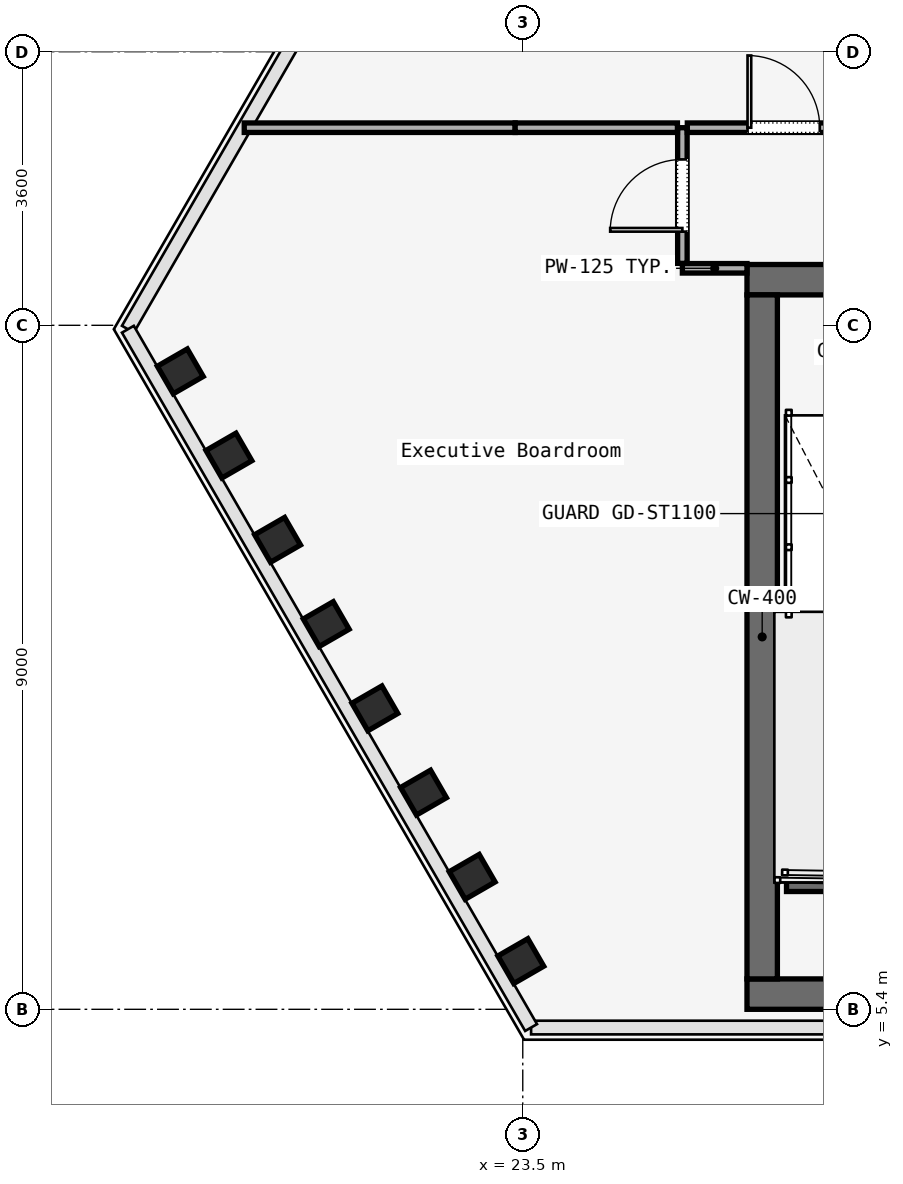
"""IFC4 building model, lengths in metres.
Left out: names, types, materials, properties, quantities, classifications, styles, units other than length and angle.
Written with IfcOpenShell. Run it as: python <this file> out.ifc"""

import sys

from ifc_helpers import new_model, si_unit, direction, frame, frame_2d, origin, origin_2d, place, context, subcontext, project, spatial, rectangle, i_section, extrude, element, fill, save


model = new_model("IFC4")
c1 = context("Model", 3, precision=1e-05, world=origin(), true_north=direction((0.0, 1.0)))
c2 = subcontext(c1, "Body", "Model", "MODEL_VIEW")
j1 = project(units=[si_unit("LENGTHUNIT", "METRE"), si_unit("PLANEANGLEUNIT", "RADIAN")], contexts=[c1])
p1 = place(None, origin())
s1 = spatial("IfcSite", under=j1, at=p1, CompositionType="ELEMENT")
p2 = place(p1, origin())
s2 = spatial("IfcBuilding", under=s1, at=p2, CompositionType="ELEMENT")
p3 = place(p2, frame((0.0, 0.0, 168.8)))
s3 = spatial("IfcBuildingStorey", under=s2, at=p3, CompositionType="ELEMENT", Elevation=168.8)
p4 = place(p3, frame((26.45, 15.0, 0.0), z_axis=(0.0, 0.0, 1.0), x_axis=(1.0, 0.0, 0.0)))
e1 = element("IfcWall", 1, at=p4, inside=s3, PredefinedType="SOLIDWALL", context=c2, shape_type="SweptSolid", body=[
    extrude(rectangle(XDim=31.1, YDim=0.4, at=frame_2d((15.55, 0.0))), origin(), (0.0, 0.0, 1.0), 3.58),
])
p5 = place(p4, frame((1.65, 0.0, 0.0)))
e2 = element("IfcOpeningElement", 2, at=p5, cuts=e1, PredefinedType="OPENING", context=c2, shape_type="SweptSolid", body=[
    extrude(rectangle(XDim=1.1, YDim=2.2, at=frame_2d((0.55, 1.1))), frame((0.0, 0.2, 0.0), z_axis=(0.0, -1.0, 0.0), x_axis=(1.0, 0.0, 0.0)), (0.0, 0.0, 1.0), 0.4),
])
p6 = place(p4, frame((13.65, 0.0, 0.0)))
e3 = element("IfcOpeningElement", 3, at=p6, cuts=e1, PredefinedType="OPENING", context=c2, shape_type="SweptSolid", body=[
    extrude(rectangle(XDim=1.1, YDim=2.2, at=frame_2d((0.55, 1.1))), frame((0.0, 0.2, 0.0), z_axis=(0.0, -1.0, 0.0), x_axis=(1.0, 0.0, 0.0)), (0.0, 0.0, 1.0), 0.4),
])
p7 = place(p4, frame((25.55, 0.0, 0.0)))
e4 = element("IfcOpeningElement", 4, at=p7, cuts=e1, PredefinedType="OPENING", context=c2, shape_type="SweptSolid", body=[
    extrude(rectangle(XDim=1.1, YDim=2.2, at=frame_2d((0.55, 1.1))), frame((0.0, 0.2, 0.0), z_axis=(0.0, -1.0, 0.0), x_axis=(1.0, 0.0, 0.0)), (0.0, 0.0, 1.0), 0.4),
])
p8 = place(p4, frame((10.7, 0.0, 0.0)))
e5 = element("IfcOpeningElement", 5, at=p8, cuts=e1, PredefinedType="OPENING", context=c2, shape_type="SweptSolid", body=[
    extrude(rectangle(XDim=1.4, YDim=2.2, at=frame_2d((0.7, 1.1))), frame((0.0, 0.2, 0.0), z_axis=(0.0, -1.0, 0.0), x_axis=(1.0, 0.0, 0.0)), (0.0, 0.0, 1.0), 0.4),
])
p9 = place(p4, frame((19.35, 0.0, 0.0)))
e6 = element("IfcOpeningElement", 6, at=p9, cuts=e1, PredefinedType="OPENING", context=c2, shape_type="SweptSolid", body=[
    extrude(rectangle(XDim=1.1, YDim=2.2, at=frame_2d((0.55, 1.1))), frame((0.0, 0.2, 0.0), z_axis=(0.0, -1.0, 0.0), x_axis=(1.0, 0.0, 0.0)), (0.0, 0.0, 1.0), 0.4),
])
p10 = place(p4, frame((21.4, 0.0, 0.0)))
e7 = element("IfcOpeningElement", 7, at=p10, cuts=e1, PredefinedType="OPENING", context=c2, shape_type="SweptSolid", body=[
    extrude(rectangle(XDim=0.9, YDim=2.1, at=frame_2d((0.45, 1.05))), frame((0.0, 0.2, 0.0), z_axis=(0.0, -1.0, 0.0), x_axis=(1.0, 0.0, 0.0)), (0.0, 0.0, 1.0), 0.4),
])
p11 = place(p4, frame((23.35, 0.0, 0.0)))
e8 = element("IfcOpeningElement", 8, at=p11, cuts=e1, PredefinedType="OPENING", context=c2, shape_type="SweptSolid", body=[
    extrude(rectangle(XDim=1.3, YDim=2.3, at=frame_2d((0.65, 1.15))), frame((0.0, 0.2, 0.0), z_axis=(0.0, -1.0, 0.0), x_axis=(1.0, 0.0, 0.0)), (0.0, 0.0, 1.0), 0.4),
])
p12 = place(p3, frame((26.45, 5.6, 0.0), z_axis=(0.0, 0.0, 1.0), x_axis=(1.0, 0.0, 0.0)))
e9 = element("IfcWall", 9, at=p12, inside=s3, PredefinedType="SOLIDWALL", context=c2, shape_type="SweptSolid", body=[
    extrude(rectangle(XDim=31.1, YDim=0.4, at=frame_2d((15.55, 0.0))), origin(), (0.0, 0.0, 1.0), 3.58),
])
p13 = place(p3, frame((26.65, 5.8, 0.0), z_axis=(0.0, 0.0, 1.0), x_axis=(0.0, 1.0, 0.0)))
e10 = element("IfcWall", 10, at=p13, inside=s3, PredefinedType="SOLIDWALL", context=c2, shape_type="SweptSolid", body=[
    extrude(rectangle(XDim=9.0, YDim=0.4, at=frame_2d((4.5, 0.0))), origin(), (0.0, 0.0, 1.0), 3.58),
])
p14 = place(p3, frame((18.994, 13.794, 0.0), z_axis=(-0.012375647772, -0.12869321153, 0.991607231039), x_axis=(-0.41550177193, 0.902674887769, 0.111965729193)))
e11 = element("IfcColumn", 11, at=p14, inside=s3, PredefinedType="COLUMN", context=c2, shape_type="SweptSolid", body=[
    extrude(i_section(OverallWidth=0.418, OverallDepth=0.455, WebThickness=0.042, FlangeThickness=0.052, FilletRadius=0.015, at=origin_2d()), origin(), (0.0, 0.0, 1.0), 3.61),
])
p15 = place(p3, frame((19.634, 12.686, 0.0), z_axis=(-0.022291333243, -0.111727685465, 0.993488812601), x_axis=(-0.321993963103, 0.941586375909, 0.098666024689)))
e12 = element("IfcColumn", 12, at=p15, inside=s3, PredefinedType="COLUMN", context=c2, shape_type="SweptSolid", body=[
    extrude(i_section(OverallWidth=0.418, OverallDepth=0.455, WebThickness=0.042, FlangeThickness=0.052, FilletRadius=0.015, at=origin_2d()), origin(), (0.0, 0.0, 1.0), 3.603),
])
p16 = place(p3, frame((20.274, 11.577, 0.0), z_axis=(-0.032299876946, -0.094660353653, 0.994985495068), x_axis=(-0.194941646641, 0.976982525919, 0.08661927299)))
e13 = element("IfcColumn", 13, at=p16, inside=s3, PredefinedType="COLUMN", context=c2, shape_type="SweptSolid", body=[
    extrude(i_section(OverallWidth=0.418, OverallDepth=0.455, WebThickness=0.042, FlangeThickness=0.052, FilletRadius=0.015, at=origin_2d()), origin(), (0.0, 0.0, 1.0), 3.598),
])
p17 = place(p3, frame((20.914, 10.469, 0.0), z_axis=(-0.042253853596, -0.07757861866, 0.996090442572), x_axis=(-0.026482675883, 0.996717510238, 0.076504069583)))
e14 = element("IfcColumn", 14, at=p17, inside=s3, PredefinedType="COLUMN", context=c2, shape_type="SweptSolid", body=[
    extrude(i_section(OverallWidth=0.418, OverallDepth=0.455, WebThickness=0.042, FlangeThickness=0.052, FilletRadius=0.015, at=origin_2d()), origin(), (0.0, 0.0, 1.0), 3.594),
])
p18 = place(p3, frame((21.554, 9.36, 0.0), z_axis=(-0.052277437958, -0.060367184534, 0.996806336513), x_axis=(0.187152330138, 0.979893443037, 0.069158120391)))
e15 = element("IfcColumn", 15, at=p18, inside=s3, PredefinedType="COLUMN", context=c2, shape_type="SweptSolid", body=[
    extrude(i_section(OverallWidth=0.418, OverallDepth=0.455, WebThickness=0.042, FlangeThickness=0.052, FilletRadius=0.015, at=origin_2d()), origin(), (0.0, 0.0, 1.0), 3.591),
])
p19 = place(p3, frame((22.194, 8.251, 0.0), z_axis=(-0.062222727162, -0.043181892621, 0.997127703142), x_axis=(0.42436373933, 0.903113037788, 0.065591597932)))
e16 = element("IfcColumn", 16, at=p19, inside=s3, PredefinedType="COLUMN", context=c2, shape_type="SweptSolid", body=[
    extrude(i_section(OverallWidth=0.418, OverallDepth=0.455, WebThickness=0.042, FlangeThickness=0.052, FilletRadius=0.015, at=origin_2d()), origin(), (0.0, 0.0, 1.0), 3.59),
])
p20 = place(p3, frame((22.834, 7.143, 0.0), z_axis=(-0.072213729702, -0.025907185515, 0.997052654067), x_axis=(0.643910482104, 0.762210461272, 0.066441732097)))
e17 = element("IfcColumn", 17, at=p20, inside=s3, PredefinedType="COLUMN", context=c2, shape_type="SweptSolid", body=[
    extrude(i_section(OverallWidth=0.418, OverallDepth=0.455, WebThickness=0.042, FlangeThickness=0.052, FilletRadius=0.015, at=origin_2d()), origin(), (0.0, 0.0, 1.0), 3.59),
])
p21 = place(p3, frame((23.474, 6.034, 0.0), z_axis=(-0.082103059237, -0.008563729689, 0.996587050988), x_axis=(0.806541885036, 0.586838564114, 0.071489071554)))
e18 = element("IfcColumn", 18, at=p21, inside=s3, PredefinedType="COLUMN", context=c2, shape_type="SweptSolid", body=[
    extrude(i_section(OverallWidth=0.418, OverallDepth=0.455, WebThickness=0.042, FlangeThickness=0.052, FilletRadius=0.015, at=origin_2d()), origin(), (0.0, 0.0, 1.0), 3.592),
])
p22 = place(p3, frame((26.97, 7.05, 0.0), z_axis=(0.0, 0.0, 1.0), x_axis=(1.0, 0.0, 0.0)))
e19 = element("IfcWall", 19, at=p22, inside=s3, PredefinedType="SOLIDWALL", context=c2, shape_type="SweptSolid", body=[
    extrude(rectangle(XDim=3.115, YDim=0.2, at=frame_2d((1.558, 0.0))), origin(), (0.0, 0.0, 1.0), 3.8),
])
p23 = place(p3, frame((26.45, 15.15, 0.0), z_axis=(0.0, 0.0, 1.0), x_axis=(-1.0, 0.0, 0.0)))
e20 = element("IfcWall", 20, at=p23, inside=s3, PredefinedType="PARTITIONING", context=c2, shape_type="SweptSolid", body=[
    extrude(rectangle(XDim=0.85, YDim=0.125, at=frame_2d((0.425, 0.0))), origin(), (0.0, 0.0, 1.0), 3.01),
])
p24 = place(p3, frame((25.6, 15.215, 0.0), z_axis=(0.0, 0.0, 1.0), x_axis=(0.0, 1.0, 0.0)))
e21 = element("IfcWall", 21, at=p24, inside=s3, PredefinedType="PARTITIONING", context=c2, shape_type="SweptSolid", body=[
    extrude(rectangle(XDim=1.785, YDim=0.125, at=frame_2d((0.893, 0.0))), origin(), (0.0, 0.0, 1.0), 3.01),
])
p25 = place(p24, frame((0.417, 0.0, 0.0)))
e22 = element("IfcOpeningElement", 22, at=p25, cuts=e21, PredefinedType="OPENING", context=c2, shape_type="SweptSolid", body=[
    extrude(rectangle(XDim=0.95, YDim=2.2, at=frame_2d((0.475, 1.1))), frame((0.0, 0.062, 0.0), z_axis=(0.0, -1.0, 0.0), x_axis=(1.0, 0.0, 0.0)), (0.0, 0.0, 1.0), 0.125),
])
p26 = place(p3, frame((25.665, 17.0, 0.0), z_axis=(0.0, 0.0, 1.0), x_axis=(1.0, 0.0, 0.0)))
e23 = element("IfcWall", 23, at=p26, inside=s3, PredefinedType="PARTITIONING", context=c2, shape_type="SweptSolid", body=[
    extrude(rectangle(XDim=2.535, YDim=0.125, at=frame_2d((1.268, 0.0))), origin(), (0.0, 0.0, 1.0), 3.01),
])
p27 = place(p26, frame((0.792, 0.0, 0.0)))
e24 = element("IfcOpeningElement", 24, at=p27, cuts=e23, PredefinedType="OPENING", context=c2, shape_type="SweptSolid", body=[
    extrude(rectangle(XDim=0.95, YDim=2.2, at=frame_2d((0.475, 1.1))), frame((0.0, 0.062, 0.0), z_axis=(0.0, -1.0, 0.0), x_axis=(1.0, 0.0, 0.0)), (0.0, 0.0, 1.0), 0.125),
])
p28 = place(p3, frame((19.835, 17.0, 0.0), z_axis=(0.0, 0.0, 1.0), x_axis=(1.0, 0.0, 0.0)))
e25 = element("IfcWall", 25, at=p28, inside=s3, PredefinedType="PARTITIONING", context=c2, shape_type="SweptSolid", body=[
    extrude(rectangle(XDim=3.564, YDim=0.125, at=frame_2d((1.782, 0.0))), origin(), (0.0, 0.0, 1.0), 3.01),
])
p29 = place(p3, frame((23.4, 17.0, 0.0), z_axis=(0.0, 0.0, 1.0), x_axis=(1.0, 0.0, 0.0)))
e26 = element("IfcWall", 26, at=p29, inside=s3, PredefinedType="PARTITIONING", context=c2, shape_type="SweptSolid", body=[
    extrude(rectangle(XDim=2.135, YDim=0.125, at=frame_2d((1.067, 0.0))), origin(), (0.0, 0.0, 1.0), 3.01),
])
p30 = place(p25, origin())
e27 = element("IfcDoor", 27, at=p30, inside=s3, OperationType="SINGLE_SWING_LEFT", PredefinedType="DOOR", context=c2, shape_type="SweptSolid", body=[
    extrude(rectangle(XDim=0.95, YDim=2.2, at=frame_2d((0.475, 1.1))), frame((0.0, 0.025, 0.0), z_axis=(0.0, -1.0, 0.0), x_axis=(1.0, 0.0, 0.0)), (0.0, 0.0, 1.0), 0.05),
])
fill(e22, e27)
p31 = place(p27, origin())
e28 = element("IfcDoor", 28, at=p31, inside=s3, OperationType="SINGLE_SWING_RIGHT", PredefinedType="DOOR", context=c2, shape_type="SweptSolid", body=[
    extrude(rectangle(XDim=0.95, YDim=2.2, at=frame_2d((0.475, 1.1))), frame((0.0, 0.025, 0.0), z_axis=(0.0, -1.0, 0.0), x_axis=(1.0, 0.0, 0.0)), (0.0, 0.0, 1.0), 0.05),
])
fill(e24, e28)
save(model, sys.argv[1])
